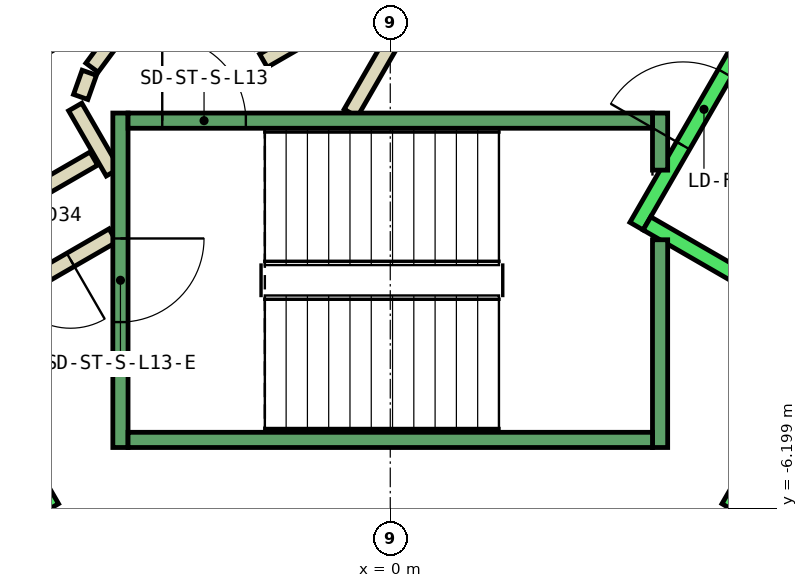
"""IFC4 building model, lengths in metres.
Left out: names, types, materials, properties, quantities, classifications, styles, units other than length and angle.
Written with IfcOpenShell. Run it as: python <this file> out.ifc"""

import sys

from ifc_helpers import new_model, si_unit, direction, frame, frame_2d, origin, place, context, subcontext, project, spatial, rectangle, extrude, element, fill, save


model = new_model("IFC4")
c1 = context("Model", 3, precision=1e-05, world=origin(), true_north=direction((0.0, 1.0)))
c2 = subcontext(c1, "Body", "Model", "MODEL_VIEW")
j1 = project(units=[si_unit("LENGTHUNIT", "METRE"), si_unit("PLANEANGLEUNIT", "RADIAN")], contexts=[c1])
p1 = place(None, origin())
s1 = spatial("IfcSite", under=j1, at=p1, CompositionType="ELEMENT")
p2 = place(p1, origin())
s2 = spatial("IfcBuilding", under=s1, at=p2, CompositionType="ELEMENT")
p3 = place(p2, frame((0.0, 0.0, 64.4)))
s3 = spatial("IfcBuildingStorey", under=s2, at=p3, CompositionType="ELEMENT", Elevation=64.4)
p4 = place(p3, frame((-3.9, -1.599, 0.0), z_axis=(0.0, 0.0, 1.0), x_axis=(-0.865969445389, -0.500096910261, 0.0)))
e1 = element("IfcWall", 1, at=p4, inside=s3, PredefinedType="PARTITIONING", context=c2, shape_type="SweptSolid", body=[
    extrude(rectangle(XDim=1.373, YDim=0.2, at=frame_2d((0.687, 0.0))), origin(), (0.0, 0.0, 1.0), 3.8),
])
p5 = place(p3, frame((-3.65, -2.61, 0.0), z_axis=(0.0, 0.0, 1.0), x_axis=(-0.866072462134, -0.499918483688, 0.0)))
e2 = element("IfcWall", 2, at=p5, inside=s3, PredefinedType="PARTITIONING", context=c2, shape_type="SweptSolid", body=[
    extrude(rectangle(XDim=2.084, YDim=0.2, at=frame_2d((1.042, 0.0))), origin(), (0.0, 0.0, 1.0), 3.8),
])
p6 = place(p5, frame((0.642, 0.0, 0.0)))
e3 = element("IfcOpeningElement", 3, at=p6, cuts=e2, PredefinedType="OPENING", context=c2, shape_type="SweptSolid", body=[
    extrude(rectangle(XDim=0.9, YDim=2.1, at=frame_2d((0.45, 1.05))), frame((0.0, 0.11, 0.0), z_axis=(0.0, -1.0, 0.0), x_axis=(1.0, 0.0, 0.0)), (0.0, 0.0, 1.0), 0.22),
])
p7 = place(p3, frame((-4.145, -0.92, 0.0), z_axis=(0.0, 0.0, 1.0), x_axis=(0.499743786207, -0.866173278362, 0.0)))
e4 = element("IfcWall", 4, at=p7, inside=s3, PredefinedType="PARTITIONING", context=c2, shape_type="SweptSolid", body=[
    extrude(rectangle(XDim=0.991, YDim=0.2, at=frame_2d((0.495, 0.0))), origin(), (0.0, 0.0, 1.0), 3.8),
])
p8 = place(p3, frame((-0.52, -1.0, 0.0), z_axis=(0.0, 0.0, 1.0), x_axis=(0.50011622646, 0.865958290007, 0.0)))
e5 = element("IfcWall", 5, at=p8, inside=s3, PredefinedType="PARTITIONING", context=c2, shape_type="SweptSolid", body=[
    extrude(rectangle(XDim=4.991, YDim=0.2, at=frame_2d((2.496, 0.0))), origin(), (0.0, 0.0, 1.0), 3.8),
])
p9 = place(p8, frame((1.945, 0.0, 0.0)))
e6 = element("IfcOpeningElement", 6, at=p9, cuts=e5, PredefinedType="OPENING", context=c2, shape_type="SweptSolid", body=[
    extrude(rectangle(XDim=1.0, YDim=2.1, at=frame_2d((0.5, 1.05))), frame((0.0, 0.11, 0.0), z_axis=(0.0, -1.0, 0.0), x_axis=(1.0, 0.0, 0.0)), (0.0, 0.0, 1.0), 0.22),
])
p10 = place(p3, frame((-0.412, 0.414, 0.0), z_axis=(0.0, 0.0, 1.0), x_axis=(-0.866017369001, -0.500013916395, 0.0)))
e7 = element("IfcWall", 7, at=p10, inside=s3, PredefinedType="PARTITIONING", context=c2, shape_type="SweptSolid", body=[
    extrude(rectangle(XDim=1.45, YDim=0.2, at=frame_2d((0.725, 0.0))), origin(), (0.0, 0.0, 1.0), 3.8),
])
p11 = place(p3, frame((-3.723, -0.131, 0.0), z_axis=(0.0, 0.0, 1.0), x_axis=(-0.594675113454, -0.803966112121, 0.0)))
e8 = element("IfcWall", 8, at=p11, inside=s3, PredefinedType="PARTITIONING", context=c2, shape_type="SweptSolid", body=[
    extrude(rectangle(XDim=0.338, YDim=0.2, at=frame_2d((0.169, 0.0))), origin(), (0.0, 0.0, 1.0), 3.8),
])
p12 = place(p3, frame((-3.96, -0.47, 0.0), z_axis=(0.0, 0.0, 1.0), x_axis=(-0.334824194261, -0.942280615813, 0.0)))
e9 = element("IfcWall", 9, at=p12, inside=s3, PredefinedType="PARTITIONING", context=c2, shape_type="SweptSolid", body=[
    extrude(rectangle(XDim=0.338, YDim=0.2, at=frame_2d((0.169, 0.0))), origin(), (0.0, 0.0, 1.0), 3.8),
])
p13 = place(p3, frame((-9.751, 2.99, 0.0), z_axis=(0.0, 0.0, 1.0), x_axis=(0.50000090737, -0.866024879913, 0.0)))
e10 = element("IfcWall", 10, at=p13, inside=s3, PredefinedType="STANDARD", context=c2, shape_type="SweptSolid", body=[
    extrude(rectangle(XDim=10.6, YDim=0.2, at=frame_2d((5.3, 0.0))), origin(), (0.0, 0.0, 1.0), 3.8),
])
p14 = place(p3, frame((3.24, -2.488, 0.0), z_axis=(0.0, 0.0, 1.0), x_axis=(0.49994636267, 0.866056369097, 0.0)))
e11 = element("IfcWall", 11, at=p14, inside=s3, PredefinedType="STANDARD", context=c2, shape_type="SweptSolid", body=[
    extrude(rectangle(XDim=2.8, YDim=0.2, at=frame_2d((1.4, 0.0))), origin(), (0.0, 0.0, 1.0), 3.8),
])
p15 = place(p14, frame((1.225, 0.0, 0.0)))
e12 = element("IfcOpeningElement", 12, at=p15, cuts=e11, PredefinedType="OPENING", context=c2, shape_type="SweptSolid", body=[
    extrude(rectangle(XDim=1.1, YDim=2.1, at=frame_2d((0.55, 1.05))), frame((0.0, 0.11, 0.0), z_axis=(0.0, -1.0, 0.0), x_axis=(1.0, 0.0, 0.0)), (0.0, 0.0, 1.0), 0.22),
])
p16 = place(p3, frame((3.377, -2.452, 0.0), z_axis=(0.0, 0.0, 1.0), x_axis=(0.865955154139, -0.50012165622, 0.0)))
e13 = element("IfcWall", 13, at=p16, inside=s3, PredefinedType="STANDARD", context=c2, shape_type="SweptSolid", body=[
    extrude(rectangle(XDim=2.4, YDim=0.2, at=frame_2d((1.2, 0.0))), origin(), (0.0, 0.0, 1.0), 3.8),
])
p17 = place(p3, frame((4.451, -6.19, 0.0), z_axis=(0.0, 0.0, 1.0), x_axis=(0.50000090737, 0.866024879913, 0.0)))
e14 = element("IfcWall", 14, at=p17, inside=s3, PredefinedType="STANDARD", context=c2, shape_type="SweptSolid", body=[
    extrude(rectangle(XDim=10.6, YDim=0.2, at=frame_2d((5.3, 0.0))), origin(), (0.0, 0.0, 1.0), 3.8),
])
p18 = place(p3, frame((-3.55, -1.0, 0.0), z_axis=(0.0, 0.0, 1.0), x_axis=(0.0, -1.0, 0.0)))
e15 = element("IfcWall", 15, at=p18, inside=s3, PredefinedType="STANDARD", context=c2, shape_type="SweptSolid", body=[
    extrude(rectangle(XDim=4.4, YDim=0.2, at=frame_2d((2.2, 0.0))), origin(), (0.0, 0.0, 1.0), 3.8),
])
p19 = place(p18, frame((1.65, 0.0, 0.0)))
e16 = element("IfcOpeningElement", 16, at=p19, cuts=e15, PredefinedType="OPENING", context=c2, shape_type="SweptSolid", body=[
    extrude(rectangle(XDim=1.1, YDim=2.2, at=frame_2d((0.55, 1.1))), frame((0.0, 0.11, 0.0), z_axis=(0.0, -1.0, 0.0), x_axis=(1.0, 0.0, 0.0)), (0.0, 0.0, 1.0), 0.22),
])
p20 = place(p3, frame((3.55, -2.667, 0.0), z_axis=(0.0, 0.0, 1.0), x_axis=(0.0, -1.0, 0.0)))
e17 = element("IfcWall", 17, at=p20, inside=s3, PredefinedType="STANDARD", context=c2, shape_type="SweptSolid", body=[
    extrude(rectangle(XDim=2.733, YDim=0.2, at=frame_2d((1.366, 0.0))), origin(), (0.0, 0.0, 1.0), 3.8),
])
p21 = place(p3, frame((3.55, -1.0, 0.0), z_axis=(0.0, 0.0, 1.0), x_axis=(0.0, -1.0, 0.0)))
e18 = element("IfcWall", 18, at=p21, inside=s3, PredefinedType="STANDARD", context=c2, shape_type="SweptSolid", body=[
    extrude(rectangle(XDim=0.751, YDim=0.2, at=frame_2d((0.375, 0.0))), origin(), (0.0, 0.0, 1.0), 3.8),
])
p22 = place(p3, frame((-3.45, -1.1, 0.0), z_axis=(0.0, 0.0, 1.0), x_axis=(1.0, 0.0, 0.0)))
e19 = element("IfcWall", 19, at=p22, inside=s3, PredefinedType="STANDARD", context=c2, shape_type="SweptSolid", body=[
    extrude(rectangle(XDim=6.9, YDim=0.2, at=frame_2d((3.45, 0.0))), origin(), (0.0, 0.0, 1.0), 3.8),
])
p23 = place(p22, frame((0.45, 0.0, 0.0)))
e20 = element("IfcOpeningElement", 20, at=p23, cuts=e19, PredefinedType="OPENING", context=c2, shape_type="SweptSolid", body=[
    extrude(rectangle(XDim=1.1, YDim=2.2, at=frame_2d((0.55, 1.1))), frame((0.0, 0.11, 0.0), z_axis=(0.0, -1.0, 0.0), x_axis=(1.0, 0.0, 0.0)), (0.0, 0.0, 1.0), 0.22),
])
p24 = place(p3, frame((-3.45, -5.3, 0.0), z_axis=(0.0, 0.0, 1.0), x_axis=(1.0, 0.0, 0.0)))
e21 = element("IfcWall", 21, at=p24, inside=s3, PredefinedType="STANDARD", context=c2, shape_type="SweptSolid", body=[
    extrude(rectangle(XDim=6.9, YDim=0.2, at=frame_2d((3.45, 0.0))), origin(), (0.0, 0.0, 1.0), 3.8),
])
p25 = place(p6, origin())
e22 = element("IfcDoor", 22, at=p25, inside=s3, OperationType="SINGLE_SWING_LEFT", PredefinedType="DOOR", context=c2, shape_type="SweptSolid", body=[
    extrude(rectangle(XDim=0.9, YDim=2.1, at=frame_2d((0.45, 1.05))), frame((0.0, 0.025, 0.0), z_axis=(0.0, -1.0, 0.0), x_axis=(1.0, 0.0, 0.0)), (0.0, 0.0, 1.0), 0.05),
])
fill(e3, e22)
p26 = place(p15, origin())
e23 = element("IfcDoor", 23, at=p26, inside=s3, OperationType="SLIDING_TO_LEFT", PredefinedType="DOOR", context=c2, shape_type="SweptSolid", body=[
    extrude(rectangle(XDim=1.1, YDim=2.1, at=frame_2d((0.55, 1.05))), frame((0.0, 0.025, 0.0), z_axis=(0.0, -1.0, 0.0), x_axis=(1.0, 0.0, 0.0)), (0.0, 0.0, 1.0), 0.05),
])
fill(e12, e23)
p27 = place(p23, origin())
e24 = element("IfcDoor", 24, at=p27, inside=s3, OperationType="SINGLE_SWING_LEFT", PredefinedType="DOOR", context=c2, shape_type="SweptSolid", body=[
    extrude(rectangle(XDim=1.1, YDim=2.2, at=frame_2d((0.55, 1.1))), frame((0.0, 0.025, 0.0), z_axis=(0.0, -1.0, 0.0), x_axis=(1.0, 0.0, 0.0)), (0.0, 0.0, 1.0), 0.05),
])
fill(e20, e24)
p28 = place(p19, origin())
e25 = element("IfcDoor", 25, at=p28, inside=s3, OperationType="SINGLE_SWING_LEFT", PredefinedType="DOOR", context=c2, shape_type="SweptSolid", body=[
    extrude(rectangle(XDim=1.1, YDim=2.2, at=frame_2d((0.55, 1.1))), frame((0.0, 0.025, 0.0), z_axis=(0.0, -1.0, 0.0), x_axis=(1.0, 0.0, 0.0)), (0.0, 0.0, 1.0), 0.05),
])
fill(e16, e25)
save(model, sys.argv[1])
